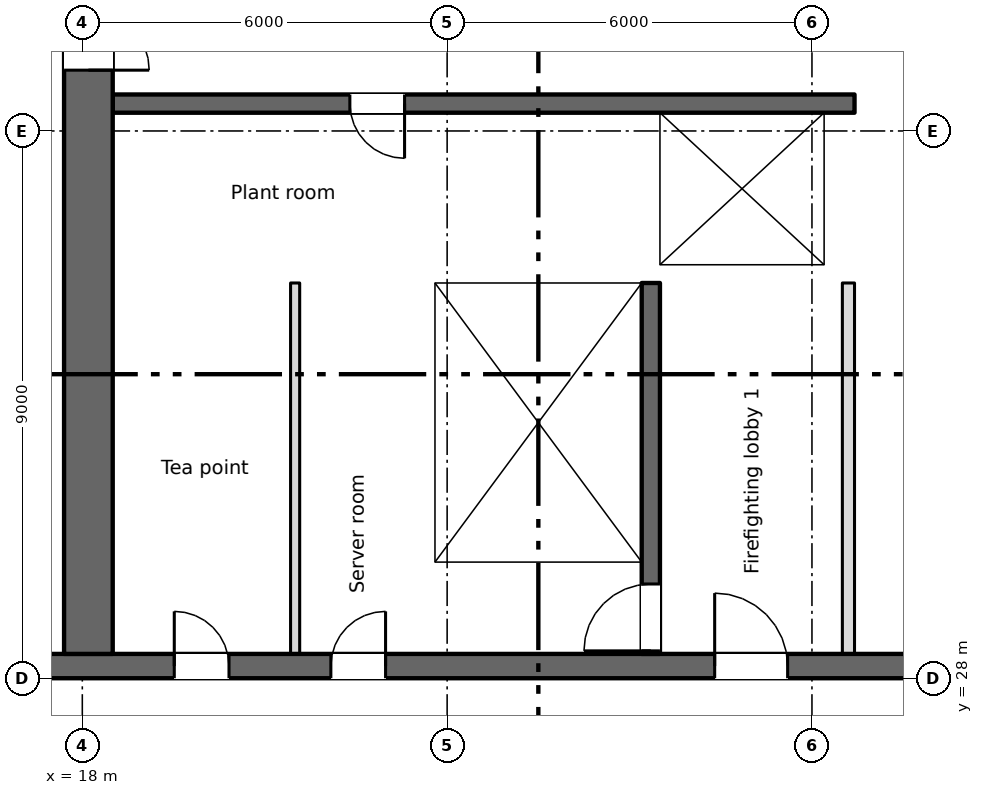
"""IFC4 building model, lengths in metres.
Left out: names, types, materials, properties, quantities, classifications, styles, units other than length and angle.
Written with IfcOpenShell. Run it as: python <this file> out.ifc"""

import sys

from ifc_helpers import new_model, si_unit, direction, frame, frame_2d, origin, place, context, subcontext, project, spatial, rectangle, extrude, element, fill, save


model = new_model("IFC4")
c1 = context("Model", 3, precision=1e-05, world=origin(), true_north=direction((0.0, 1.0)))
c2 = subcontext(c1, "Body", "Model", "MODEL_VIEW")
j1 = project(units=[si_unit("LENGTHUNIT", "METRE"), si_unit("PLANEANGLEUNIT", "RADIAN")], contexts=[c1])
p1 = place(None, origin())
s1 = spatial("IfcSite", under=j1, at=p1, CompositionType="ELEMENT")
p2 = place(p1, origin())
s2 = spatial("IfcBuilding", under=s1, at=p2, CompositionType="ELEMENT")
p3 = place(p2, frame((0.0, 0.0, 132.5)))
s3 = spatial("IfcBuildingStorey", under=s2, at=p3, CompositionType="ELEMENT", Elevation=132.5)
p4 = place(p3, frame((6.7, 28.2, 0.0), z_axis=(0.0, 0.0, 1.0), x_axis=(1.0, 0.0, 0.0)))
e1 = element("IfcWall", 1, at=p4, inside=s3, PredefinedType="SHEAR", context=c2, shape_type="SweptSolid", body=[
    extrude(rectangle(XDim=57.8, YDim=0.4, at=frame_2d((28.9, 0.0))), origin(), (0.0, 0.0, 1.0), 3.35),
])
p5 = place(p4, frame((12.812, 0.0, 0.0)))
e2 = element("IfcOpeningElement", 2, at=p5, cuts=e1, PredefinedType="OPENING", context=c2, shape_type="SweptSolid", body=[
    extrude(rectangle(XDim=0.9, YDim=2.1, at=frame_2d((0.45, 1.05))), frame((0.0, 0.21, 0.0), z_axis=(0.0, -1.0, 0.0), x_axis=(1.0, 0.0, 0.0)), (0.0, 0.0, 1.0), 0.42),
])
p6 = place(p4, frame((15.387, 0.0, 0.0)))
e3 = element("IfcOpeningElement", 3, at=p6, cuts=e1, PredefinedType="OPENING", context=c2, shape_type="SweptSolid", body=[
    extrude(rectangle(XDim=0.9, YDim=2.1, at=frame_2d((0.45, 1.05))), frame((0.0, 0.21, 0.0), z_axis=(0.0, -1.0, 0.0), x_axis=(1.0, 0.0, 0.0)), (0.0, 0.0, 1.0), 0.42),
])
p7 = place(p4, frame((48.312, 0.0, 0.0)))
e4 = element("IfcOpeningElement", 4, at=p7, cuts=e1, PredefinedType="OPENING", context=c2, shape_type="SweptSolid", body=[
    extrude(rectangle(XDim=0.9, YDim=2.1, at=frame_2d((0.45, 1.05))), frame((0.0, 0.21, 0.0), z_axis=(0.0, -1.0, 0.0), x_axis=(1.0, 0.0, 0.0)), (0.0, 0.0, 1.0), 0.42),
])
p8 = place(p4, frame((50.887, 0.0, 0.0)))
e5 = element("IfcOpeningElement", 5, at=p8, cuts=e1, PredefinedType="OPENING", context=c2, shape_type="SweptSolid", body=[
    extrude(rectangle(XDim=0.9, YDim=2.1, at=frame_2d((0.45, 1.05))), frame((0.0, 0.21, 0.0), z_axis=(0.0, -1.0, 0.0), x_axis=(1.0, 0.0, 0.0)), (0.0, 0.0, 1.0), 0.42),
])
p9 = place(p4, frame((0.562, 0.0, 0.0)))
e6 = element("IfcOpeningElement", 6, at=p9, cuts=e1, PredefinedType="OPENING", context=c2, shape_type="SweptSolid", body=[
    extrude(rectangle(XDim=0.9, YDim=2.1, at=frame_2d((0.45, 1.05))), frame((0.0, 0.21, 0.0), z_axis=(0.0, -1.0, 0.0), x_axis=(1.0, 0.0, 0.0)), (0.0, 0.0, 1.0), 0.42),
])
p10 = place(p4, frame((2.137, 0.0, 0.0)))
e7 = element("IfcOpeningElement", 7, at=p10, cuts=e1, PredefinedType="OPENING", context=c2, shape_type="SweptSolid", body=[
    extrude(rectangle(XDim=0.9, YDim=2.1, at=frame_2d((0.45, 1.05))), frame((0.0, 0.21, 0.0), z_axis=(0.0, -1.0, 0.0), x_axis=(1.0, 0.0, 0.0)), (0.0, 0.0, 1.0), 0.42),
])
p11 = place(p4, frame((4.7, 0.0, 0.0)))
e8 = element("IfcOpeningElement", 8, at=p11, cuts=e1, PredefinedType="OPENING", context=c2, shape_type="SweptSolid", body=[
    extrude(rectangle(XDim=1.2, YDim=2.1, at=frame_2d((0.6, 1.05))), frame((0.0, 0.21, 0.0), z_axis=(0.0, -1.0, 0.0), x_axis=(1.0, 0.0, 0.0)), (0.0, 0.0, 1.0), 0.42),
])
p12 = place(p4, frame((31.7, 0.0, 0.0)))
e9 = element("IfcOpeningElement", 9, at=p12, cuts=e1, PredefinedType="OPENING", context=c2, shape_type="SweptSolid", body=[
    extrude(rectangle(XDim=1.2, YDim=2.1, at=frame_2d((0.6, 1.05))), frame((0.0, 0.21, 0.0), z_axis=(0.0, -1.0, 0.0), x_axis=(1.0, 0.0, 0.0)), (0.0, 0.0, 1.0), 0.42),
])
p13 = place(p4, frame((55.2, 0.0, 0.0)))
e10 = element("IfcOpeningElement", 10, at=p13, cuts=e1, PredefinedType="OPENING", context=c2, shape_type="SweptSolid", body=[
    extrude(rectangle(XDim=1.2, YDim=2.1, at=frame_2d((0.6, 1.05))), frame((0.0, 0.21, 0.0), z_axis=(0.0, -1.0, 0.0), x_axis=(1.0, 0.0, 0.0)), (0.0, 0.0, 1.0), 0.42),
])
p14 = place(p4, frame((21.7, 0.0, 0.0)))
e11 = element("IfcOpeningElement", 11, at=p14, cuts=e1, PredefinedType="OPENING", context=c2, shape_type="SweptSolid", body=[
    extrude(rectangle(XDim=1.2, YDim=2.1, at=frame_2d((0.6, 1.05))), frame((0.0, 0.21, 0.0), z_axis=(0.0, -1.0, 0.0), x_axis=(1.0, 0.0, 0.0)), (0.0, 0.0, 1.0), 0.42),
])
p15 = place(p4, frame((41.7, 0.0, 0.0)))
e12 = element("IfcOpeningElement", 12, at=p15, cuts=e1, PredefinedType="OPENING", context=c2, shape_type="SweptSolid", body=[
    extrude(rectangle(XDim=1.2, YDim=2.1, at=frame_2d((0.6, 1.05))), frame((0.0, 0.21, 0.0), z_axis=(0.0, -1.0, 0.0), x_axis=(1.0, 0.0, 0.0)), (0.0, 0.0, 1.0), 0.42),
])
p16 = place(p4, frame((24.85, 0.0, 0.0)))
e13 = element("IfcOpeningElement", 13, at=p16, cuts=e1, PredefinedType="OPENING", context=c2, shape_type="SweptSolid", body=[
    extrude(rectangle(XDim=2.4, YDim=2.1, at=frame_2d((1.2, 1.05))), frame((0.0, 0.21, 0.0), z_axis=(0.0, -1.0, 0.0), x_axis=(1.0, 0.0, 0.0)), (0.0, 0.0, 1.0), 0.42),
])
p17 = place(p4, frame((37.35, 0.0, 0.0)))
e14 = element("IfcOpeningElement", 14, at=p17, cuts=e1, PredefinedType="OPENING", context=c2, shape_type="SweptSolid", body=[
    extrude(rectangle(XDim=2.4, YDim=2.1, at=frame_2d((1.2, 1.05))), frame((0.0, 0.21, 0.0), z_axis=(0.0, -1.0, 0.0), x_axis=(1.0, 0.0, 0.0)), (0.0, 0.0, 1.0), 0.42),
])
p18 = place(p4, frame((7.95, 0.0, 0.0)))
e15 = element("IfcOpeningElement", 15, at=p18, cuts=e1, PredefinedType="OPENING", context=c2, shape_type="SweptSolid", body=[
    extrude(rectangle(XDim=2.4, YDim=2.1, at=frame_2d((1.2, 1.05))), frame((0.0, 0.21, 0.0), z_axis=(0.0, -1.0, 0.0), x_axis=(1.0, 0.0, 0.0)), (0.0, 0.0, 1.0), 0.42),
])
p19 = place(p4, frame((28.85, 0.0, 0.0)))
e16 = element("IfcOpeningElement", 16, at=p19, cuts=e1, PredefinedType="OPENING", context=c2, shape_type="SweptSolid", body=[
    extrude(rectangle(XDim=0.9, YDim=2.1, at=frame_2d((0.45, 1.05))), frame((0.0, 0.21, 0.0), z_axis=(0.0, -1.0, 0.0), x_axis=(1.0, 0.0, 0.0)), (0.0, 0.0, 1.0), 0.42),
])
p20 = place(p4, frame((34.85, 0.0, 0.0)))
e17 = element("IfcOpeningElement", 17, at=p20, cuts=e1, PredefinedType="OPENING", context=c2, shape_type="SweptSolid", body=[
    extrude(rectangle(XDim=0.9, YDim=2.1, at=frame_2d((0.45, 1.05))), frame((0.0, 0.21, 0.0), z_axis=(0.0, -1.0, 0.0), x_axis=(1.0, 0.0, 0.0)), (0.0, 0.0, 1.0), 0.42),
])
p21 = place(p3, frame((18.1, 28.4, 0.0), z_axis=(0.0, 0.0, 1.0), x_axis=(0.0, 1.0, 0.0)))
e18 = element("IfcWall", 18, at=p21, inside=s3, PredefinedType="SHEAR", context=c2, shape_type="SweptSolid", body=[
    extrude(rectangle(XDim=16.8, YDim=0.8, at=frame_2d((8.4, 0.0))), origin(), (0.0, 0.0, 1.0), 3.35),
])
p22 = place(p21, frame((9.6, 0.0, 0.0)))
e19 = element("IfcOpeningElement", 19, at=p22, cuts=e18, PredefinedType="OPENING", context=c2, shape_type="SweptSolid", body=[
    extrude(rectangle(XDim=2.0, YDim=2.1, at=frame_2d((1.0, 1.05))), frame((0.0, 0.41, 0.0), z_axis=(0.0, -1.0, 0.0), x_axis=(1.0, 0.0, 0.0)), (0.0, 0.0, 1.0), 0.82),
])
p23 = place(p21, frame((15.35, 0.0, 0.0)))
e20 = element("IfcOpeningElement", 20, at=p23, cuts=e18, PredefinedType="OPENING", context=c2, shape_type="SweptSolid", body=[
    extrude(rectangle(XDim=1.2, YDim=2.1, at=frame_2d((0.6, 1.05))), frame((0.0, 0.41, 0.0), z_axis=(0.0, -1.0, 0.0), x_axis=(1.0, 0.0, 0.0)), (0.0, 0.0, 1.0), 0.82),
])
p24 = place(p3, frame((23.65, 28.4, 0.0), z_axis=(0.0, 0.0, 1.0), x_axis=(0.0, 1.0, 0.0)))
e21 = element("IfcWall", 21, at=p24, inside=s3, PredefinedType="SHEAR", context=c2, shape_type="SweptSolid", body=[
    extrude(rectangle(XDim=6.1, YDim=0.3, at=frame_2d((3.05, 0.0))), origin(), (0.0, 0.0, 1.0), 3.35),
])
p25 = place(p3, frame((27.35, 28.4, 0.0), z_axis=(0.0, 0.0, 1.0), x_axis=(0.0, 1.0, 0.0)))
e22 = element("IfcWall", 22, at=p25, inside=s3, PredefinedType="SHEAR", context=c2, shape_type="SweptSolid", body=[
    extrude(rectangle(XDim=6.1, YDim=0.3, at=frame_2d((3.05, 0.0))), origin(), (0.0, 0.0, 1.0), 3.35),
])
p26 = place(p25, frame((0.05, 0.0, 0.0)))
e23 = element("IfcOpeningElement", 23, at=p26, cuts=e22, PredefinedType="OPENING", context=c2, shape_type="SweptSolid", body=[
    extrude(rectangle(XDim=1.1, YDim=2.1, at=frame_2d((0.55, 1.05))), frame((0.0, 0.16, 0.0), z_axis=(0.0, -1.0, 0.0), x_axis=(1.0, 0.0, 0.0)), (0.0, 0.0, 1.0), 0.32),
])
p27 = place(p3, frame((18.5, 34.65, 0.0), z_axis=(0.0, 0.0, 1.0), x_axis=(1.0, 0.0, 0.0)))
e24 = element("IfcWall", 24, at=p27, inside=s3, PredefinedType="SHEAR", context=c2, shape_type="SweptSolid", body=[
    extrude(rectangle(XDim=12.2, YDim=0.3, at=frame_2d((6.1, 0.0))), origin(), (0.0, 0.0, 1.0), 3.35),
])
p28 = place(p27, frame((9.8, 0.0, 0.0)))
e25 = element("IfcOpeningElement", 25, at=p28, cuts=e24, PredefinedType="OPENING", context=c2, shape_type="SweptSolid", body=[
    extrude(rectangle(XDim=1.1, YDim=2.1, at=frame_2d((0.55, 1.05))), frame((0.0, 0.16, 0.0), z_axis=(0.0, -1.0, 0.0), x_axis=(1.0, 0.0, 0.0)), (0.0, 0.0, 1.0), 0.32),
])
p29 = place(p3, frame((30.7, 37.45, 0.0), z_axis=(0.0, 0.0, 1.0), x_axis=(-1.0, 0.0, 0.0)))
e26 = element("IfcWall", 26, at=p29, inside=s3, PredefinedType="SHEAR", context=c2, shape_type="SweptSolid", body=[
    extrude(rectangle(XDim=12.2, YDim=0.3, at=frame_2d((6.1, 0.0))), origin(), (0.0, 0.0, 1.0), 3.35),
])
p30 = place(p29, frame((7.4, 0.0, 0.0)))
e27 = element("IfcOpeningElement", 27, at=p30, cuts=e26, PredefinedType="OPENING", context=c2, shape_type="SweptSolid", body=[
    extrude(rectangle(XDim=0.9, YDim=2.1, at=frame_2d((0.45, 1.05))), frame((0.0, 0.16, 0.0), z_axis=(0.0, -1.0, 0.0), x_axis=(1.0, 0.0, 0.0)), (0.0, 0.0, 1.0), 0.32),
])
p31 = place(p3, frame((27.35, 34.8, 0.0), z_axis=(0.0, 0.0, 1.0), x_axis=(0.0, 1.0, 0.0)))
e28 = element("IfcWall", 28, at=p31, inside=s3, PredefinedType="SHEAR", context=c2, shape_type="SweptSolid", body=[
    extrude(rectangle(XDim=2.5, YDim=0.3, at=frame_2d((1.25, 0.0))), origin(), (0.0, 0.0, 1.0), 3.35),
])
p32 = place(p3, frame((30.45, 34.8, 0.0), z_axis=(0.0, 0.0, 1.0), x_axis=(0.0, 1.0, 0.0)))
e29 = element("IfcWall", 29, at=p32, inside=s3, PredefinedType="SHEAR", context=c2, shape_type="SweptSolid", body=[
    extrude(rectangle(XDim=2.5, YDim=0.5, at=frame_2d((1.25, 0.0))), origin(), (0.0, 0.0, 1.0), 3.35),
])
p33 = place(p3, frame((30.6, 28.4, 0.0), z_axis=(0.0, 0.0, 1.0), x_axis=(0.0, 1.0, 0.0)))
e30 = element("IfcWall", 30, at=p33, inside=s3, PredefinedType="PARTITIONING", context=c2, shape_type="SweptSolid", body=[
    extrude(rectangle(XDim=6.1, YDim=0.2, at=frame_2d((3.05, 0.0))), origin(), (0.0, 0.0, 1.0), 3.35),
])
p34 = place(p3, frame((21.5, 28.4, 0.0), z_axis=(0.0, 0.0, 1.0), x_axis=(0.0, 1.0, 0.0)))
e31 = element("IfcWall", 31, at=p34, inside=s3, PredefinedType="PARTITIONING", context=c2, shape_type="SweptSolid", body=[
    extrude(rectangle(XDim=6.1, YDim=0.15, at=frame_2d((3.05, 0.0))), origin(), (0.0, 0.0, 1.0), 3.35),
])
p35 = place(p5, origin())
e32 = element("IfcDoor", 32, at=p35, inside=s3, OperationType="SINGLE_SWING_LEFT", PredefinedType="DOOR", context=c2, shape_type="SweptSolid", body=[
    extrude(rectangle(XDim=0.9, YDim=2.1, at=frame_2d((0.45, 1.05))), frame((0.0, 0.025, 0.0), z_axis=(0.0, -1.0, 0.0), x_axis=(1.0, 0.0, 0.0)), (0.0, 0.0, 1.0), 0.05),
])
fill(e2, e32)
p36 = place(p6, origin())
e33 = element("IfcDoor", 33, at=p36, inside=s3, OperationType="SINGLE_SWING_RIGHT", PredefinedType="DOOR", context=c2, shape_type="SweptSolid", body=[
    extrude(rectangle(XDim=0.9, YDim=2.1, at=frame_2d((0.45, 1.05))), frame((0.0, 0.025, 0.0), z_axis=(0.0, -1.0, 0.0), x_axis=(1.0, 0.0, 0.0)), (0.0, 0.0, 1.0), 0.05),
])
fill(e3, e33)
p37 = place(p30, origin())
e34 = element("IfcDoor", 34, at=p37, inside=s3, OperationType="SINGLE_SWING_LEFT", PredefinedType="DOOR", context=c2, shape_type="SweptSolid", body=[
    extrude(rectangle(XDim=0.9, YDim=2.1, at=frame_2d((0.45, 1.05))), frame((0.0, 0.025, 0.0), z_axis=(0.0, -1.0, 0.0), x_axis=(1.0, 0.0, 0.0)), (0.0, 0.0, 1.0), 0.05),
])
fill(e27, e34)
p38 = place(p28, origin())
e35 = element("IfcDoor", 35, at=p38, inside=s3, OperationType="SLIDING_TO_LEFT", PredefinedType="DOOR", context=c2, shape_type="SweptSolid", body=[
    extrude(rectangle(XDim=1.1, YDim=2.1, at=frame_2d((0.55, 1.05))), frame((0.0, 0.025, 0.0), z_axis=(0.0, -1.0, 0.0), x_axis=(1.0, 0.0, 0.0)), (0.0, 0.0, 1.0), 0.05),
])
fill(e25, e35)
p39 = place(p26, origin())
e36 = element("IfcDoor", 36, at=p39, inside=s3, OperationType="SINGLE_SWING_LEFT", PredefinedType="DOOR", context=c2, shape_type="SweptSolid", body=[
    extrude(rectangle(XDim=1.1, YDim=2.1, at=frame_2d((0.55, 1.05))), frame((0.0, 0.025, 0.0), z_axis=(0.0, -1.0, 0.0), x_axis=(1.0, 0.0, 0.0)), (0.0, 0.0, 1.0), 0.05),
])
fill(e23, e36)
p40 = place(p14, origin())
e37 = element("IfcDoor", 37, at=p40, inside=s3, OperationType="SINGLE_SWING_LEFT", PredefinedType="DOOR", context=c2, shape_type="SweptSolid", body=[
    extrude(rectangle(XDim=1.2, YDim=2.1, at=frame_2d((0.6, 1.05))), frame((0.0, 0.025, 0.0), z_axis=(0.0, -1.0, 0.0), x_axis=(1.0, 0.0, 0.0)), (0.0, 0.0, 1.0), 0.05),
])
fill(e11, e37)
p41 = place(p22, origin())
e38 = element("IfcDoor", 38, at=p41, inside=s3, OperationType="DOUBLE_DOOR_SINGLE_SWING", PredefinedType="DOOR", context=c2, shape_type="SweptSolid", body=[
    extrude(rectangle(XDim=2.0, YDim=2.1, at=frame_2d((1.0, 1.05))), frame((0.0, 0.025, 0.0), z_axis=(0.0, -1.0, 0.0), x_axis=(1.0, 0.0, 0.0)), (0.0, 0.0, 1.0), 0.05),
])
fill(e19, e38)
save(model, sys.argv[1])
